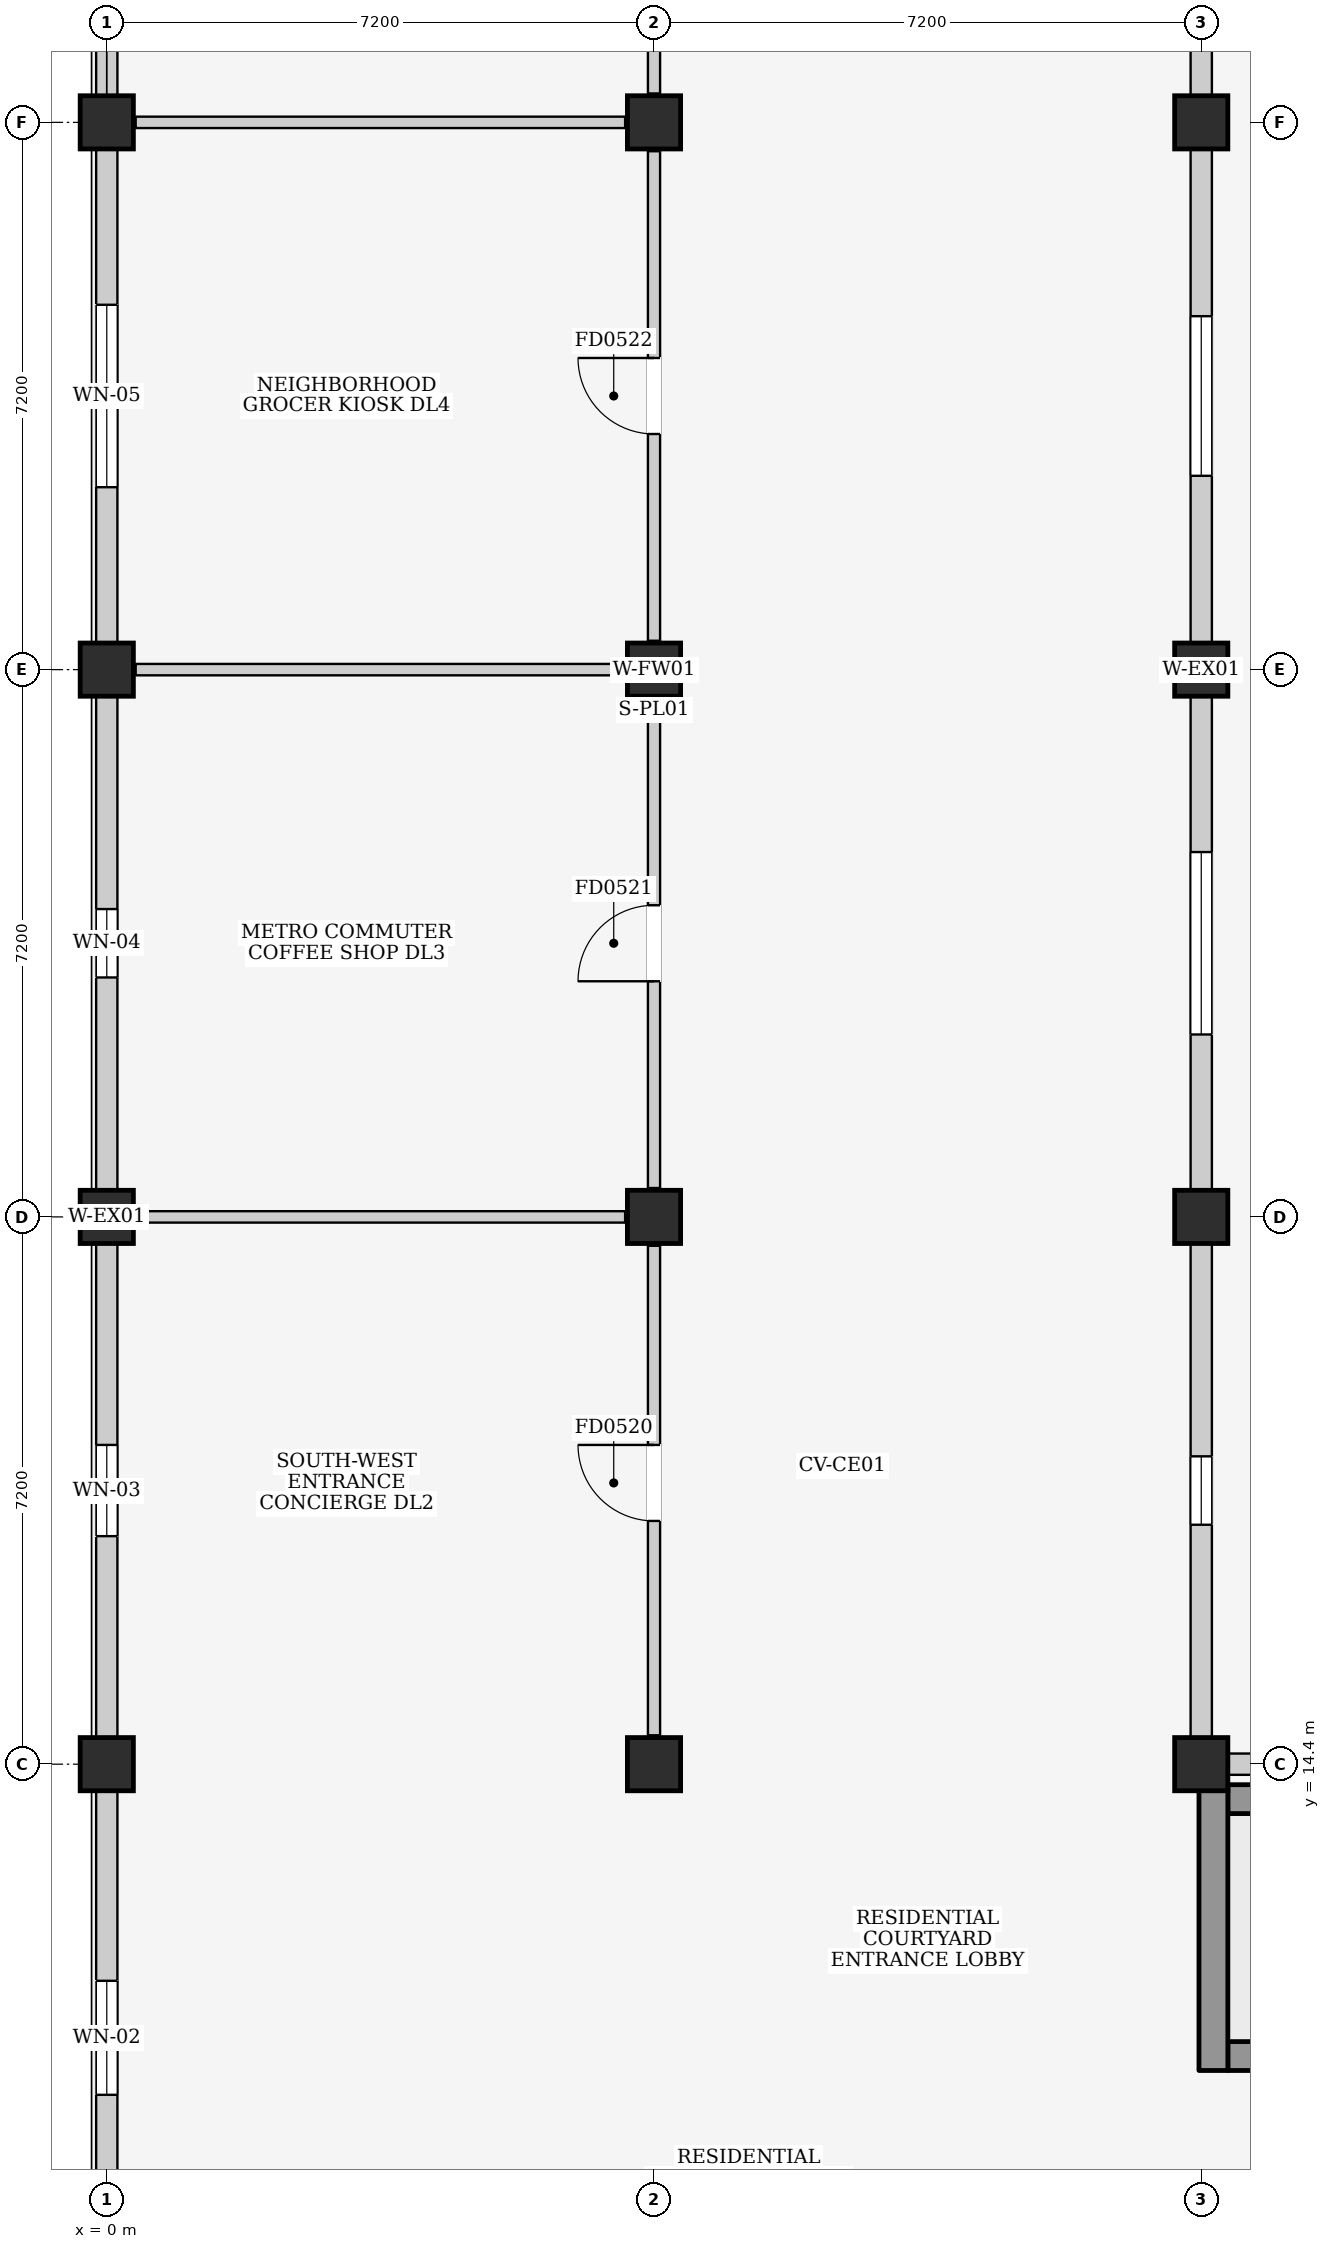
"""IFC4 building model, lengths in metres.
Left out: names, types, materials, properties, quantities, classifications, styles, units other than length and angle.
Written with IfcOpenShell. Run it as: python <this file> out.ifc"""

import sys

from ifc_helpers import new_model, si_unit, direction, frame, frame_2d, origin, origin_2d, place, context, subcontext, project, spatial, rectangle, extrude, element, fill, save


model = new_model("IFC4")
c1 = context("Model", 3, precision=1e-05, world=origin(), true_north=direction((0.0, 1.0)))
c2 = subcontext(c1, "Body", "Model", "MODEL_VIEW")
j1 = project(units=[si_unit("LENGTHUNIT", "METRE"), si_unit("PLANEANGLEUNIT", "RADIAN")], contexts=[c1])
p1 = place(None, origin())
s1 = spatial("IfcSite", under=j1, at=p1, CompositionType="ELEMENT")
p2 = place(p1, origin())
s2 = spatial("IfcBuilding", under=s1, at=p2, CompositionType="ELEMENT")
p3 = place(p2, origin())
s3 = spatial("IfcBuildingStorey", under=s2, at=p3, CompositionType="ELEMENT", Elevation=0.0)
for number, where, z_axis, x_axis in (
    (1, (0.0, 14.4, 0.0), (0.0, 0.0, 1.0), (1.0, 0.0, 0.0)),
    (2, (0.0, 21.6, 0.0), (0.0, 0.0, 1.0), (1.0, 0.0, 0.0)),
    (3, (0.0, 28.8, 0.0), (0.0, 0.0, 1.0), (1.0, 0.0, 0.0)),
    (4, (0.0, 36.0, 0.0), (0.0, 0.0, 1.0), (1.0, 0.0, 0.0)),
    (5, (7.2, 14.4, 0.0), (0.0, 0.0, 1.0), (1.0, 0.0, 0.0)),
    (6, (7.2, 21.6, 0.0), (0.0, 0.0, 1.0), (1.0, 0.0, 0.0)),
    (7, (7.2, 28.8, 0.0), (0.0, 0.0, 1.0), (1.0, 0.0, 0.0)),
    (8, (7.2, 36.0, 0.0), (0.0, 0.0, 1.0), (1.0, 0.0, 0.0)),
    (9, (14.4, 14.4, 0.0), (0.0, 0.0, 1.0), (1.0, 0.0, 0.0)),
    (10, (14.4, 21.6, 0.0), (0.0, 0.0, 1.0), (1.0, 0.0, 0.0)),
    (11, (14.4, 28.8, 0.0), (0.0, 0.0, 1.0), (1.0, 0.0, 0.0)),
    (12, (14.4, 36.0, 0.0), (0.0, 0.0, 1.0), (1.0, 0.0, 0.0)),
):
    element("IfcColumn", number, at=place(p3, frame(where, z_axis=z_axis, x_axis=x_axis)), inside=s3, PredefinedType="COLUMN", context=c2, shape_type="SweptSolid", body=[
        extrude(rectangle(XDim=0.7, YDim=0.7, at=origin_2d()), origin(), (0.0, 0.0, 1.0), 4.5),
    ])
p4 = place(p3, frame((0.0, 7.55, 0.0), z_axis=(0.0, 0.0, 1.0), x_axis=(0.0, 1.0, 0.0)))
e13 = element("IfcWall", 13, at=p4, inside=s3, PredefinedType="ELEMENTEDWALL", context=c2, shape_type="SweptSolid", body=[
    extrude(rectangle(XDim=6.5, YDim=0.28, at=frame_2d((3.25, 0.0))), origin(), (0.0, 0.0, 1.0), 3.665),
])
p5 = place(p4, frame((2.5, 0.0, 0.95)))
e14 = element("IfcOpeningElement", 14, at=p5, cuts=e13, PredefinedType="OPENING", context=c2, shape_type="SweptSolid", body=[
    extrude(rectangle(XDim=1.5, YDim=1.5, at=frame_2d((0.75, 0.75))), frame((0.0, 0.155, 0.0), z_axis=(0.0, -1.0, 0.0), x_axis=(1.0, 0.0, 0.0)), (0.0, 0.0, 1.0), 0.31),
])
p6 = place(p3, frame((0.0, 14.75, 0.0), z_axis=(0.0, 0.0, 1.0), x_axis=(0.0, 1.0, 0.0)))
e15 = element("IfcWall", 15, at=p6, inside=s3, PredefinedType="ELEMENTEDWALL", context=c2, shape_type="SweptSolid", body=[
    extrude(rectangle(XDim=6.5, YDim=0.28, at=frame_2d((3.25, 0.0))), origin(), (0.0, 0.0, 1.0), 3.665),
])
p7 = place(p6, frame((2.65, 0.0, 0.95)))
e16 = element("IfcOpeningElement", 16, at=p7, cuts=e15, PredefinedType="OPENING", context=c2, shape_type="SweptSolid", body=[
    extrude(rectangle(XDim=1.2, YDim=1.35, at=frame_2d((0.6, 0.675))), frame((0.0, 0.155, 0.0), z_axis=(0.0, -1.0, 0.0), x_axis=(1.0, 0.0, 0.0)), (0.0, 0.0, 1.0), 0.31),
])
p8 = place(p3, frame((0.0, 21.95, 0.0), z_axis=(0.0, 0.0, 1.0), x_axis=(0.0, 1.0, 0.0)))
e17 = element("IfcWall", 17, at=p8, inside=s3, PredefinedType="ELEMENTEDWALL", context=c2, shape_type="SweptSolid", body=[
    extrude(rectangle(XDim=6.5, YDim=0.28, at=frame_2d((3.25, 0.0))), origin(), (0.0, 0.0, 1.0), 3.665),
])
p9 = place(p8, frame((2.8, 0.0, 0.95)))
e18 = element("IfcOpeningElement", 18, at=p9, cuts=e17, PredefinedType="OPENING", context=c2, shape_type="SweptSolid", body=[
    extrude(rectangle(XDim=0.9, YDim=1.1, at=frame_2d((0.45, 0.55))), frame((0.0, 0.155, 0.0), z_axis=(0.0, -1.0, 0.0), x_axis=(1.0, 0.0, 0.0)), (0.0, 0.0, 1.0), 0.31),
])
p10 = place(p3, frame((0.0, 29.15, 0.0), z_axis=(0.0, 0.0, 1.0), x_axis=(0.0, 1.0, 0.0)))
e19 = element("IfcWall", 19, at=p10, inside=s3, PredefinedType="ELEMENTEDWALL", context=c2, shape_type="SweptSolid", body=[
    extrude(rectangle(XDim=6.5, YDim=0.28, at=frame_2d((3.25, 0.0))), origin(), (0.0, 0.0, 1.0), 3.665),
])
p11 = place(p10, frame((2.05, 0.0, 0.95)))
e20 = element("IfcOpeningElement", 20, at=p11, cuts=e19, PredefinedType="OPENING", context=c2, shape_type="SweptSolid", body=[
    extrude(rectangle(XDim=2.4, YDim=1.65, at=frame_2d((1.2, 0.825))), frame((0.0, 0.155, 0.0), z_axis=(0.0, -1.0, 0.0), x_axis=(1.0, 0.0, 0.0)), (0.0, 0.0, 1.0), 0.31),
])
p12 = place(p3, frame((0.0, 36.35, 0.0), z_axis=(0.0, 0.0, 1.0), x_axis=(0.0, 1.0, 0.0)))
e21 = element("IfcWall", 21, at=p12, inside=s3, PredefinedType="ELEMENTEDWALL", context=c2, shape_type="SweptSolid", body=[
    extrude(rectangle(XDim=6.5, YDim=0.28, at=frame_2d((3.25, 0.0))), origin(), (0.0, 0.0, 1.0), 3.665),
])
p13 = place(p12, frame((2.2, 0.0, 0.95)))
e22 = element("IfcOpeningElement", 22, at=p13, cuts=e21, PredefinedType="OPENING", context=c2, shape_type="SweptSolid", body=[
    extrude(rectangle(XDim=2.1, YDim=1.65, at=frame_2d((1.05, 0.825))), frame((0.0, 0.155, 0.0), z_axis=(0.0, -1.0, 0.0), x_axis=(1.0, 0.0, 0.0)), (0.0, 0.0, 1.0), 0.31),
])
p14 = place(p3, frame((14.4, 14.75, 0.0), z_axis=(0.0, 0.0, 1.0), x_axis=(0.0, 1.0, 0.0)))
e23 = element("IfcWall", 23, at=p14, inside=s3, PredefinedType="ELEMENTEDWALL", context=c2, shape_type="SweptSolid", body=[
    extrude(rectangle(XDim=6.5, YDim=0.28, at=frame_2d((3.25, 0.0))), origin(), (0.0, 0.0, 1.0), 3.435),
])
p15 = place(p14, frame((2.8, 0.0, 0.95)))
e24 = element("IfcOpeningElement", 24, at=p15, cuts=e23, PredefinedType="OPENING", context=c2, shape_type="SweptSolid", body=[
    extrude(rectangle(XDim=0.9, YDim=1.1, at=frame_2d((0.45, 0.55))), frame((0.0, 0.155, 0.0), z_axis=(0.0, -1.0, 0.0), x_axis=(1.0, 0.0, 0.0)), (0.0, 0.0, 1.0), 0.31),
])
p16 = place(p3, frame((14.4, 21.95, 0.0), z_axis=(0.0, 0.0, 1.0), x_axis=(0.0, 1.0, 0.0)))
e25 = element("IfcWall", 25, at=p16, inside=s3, PredefinedType="ELEMENTEDWALL", context=c2, shape_type="SweptSolid", body=[
    extrude(rectangle(XDim=6.5, YDim=0.28, at=frame_2d((3.25, 0.0))), origin(), (0.0, 0.0, 1.0), 3.435),
])
p17 = place(p16, frame((2.05, 0.0, 0.95)))
e26 = element("IfcOpeningElement", 26, at=p17, cuts=e25, PredefinedType="OPENING", context=c2, shape_type="SweptSolid", body=[
    extrude(rectangle(XDim=2.4, YDim=1.65, at=frame_2d((1.2, 0.825))), frame((0.0, 0.155, 0.0), z_axis=(0.0, -1.0, 0.0), x_axis=(1.0, 0.0, 0.0)), (0.0, 0.0, 1.0), 0.31),
])
p18 = place(p3, frame((14.4, 29.15, 0.0), z_axis=(0.0, 0.0, 1.0), x_axis=(0.0, 1.0, 0.0)))
e27 = element("IfcWall", 27, at=p18, inside=s3, PredefinedType="ELEMENTEDWALL", context=c2, shape_type="SweptSolid", body=[
    extrude(rectangle(XDim=6.5, YDim=0.28, at=frame_2d((3.25, 0.0))), origin(), (0.0, 0.0, 1.0), 3.435),
])
p19 = place(p18, frame((2.2, 0.0, 0.95)))
e28 = element("IfcOpeningElement", 28, at=p19, cuts=e27, PredefinedType="OPENING", context=c2, shape_type="SweptSolid", body=[
    extrude(rectangle(XDim=2.1, YDim=1.65, at=frame_2d((1.05, 0.825))), frame((0.0, 0.155, 0.0), z_axis=(0.0, -1.0, 0.0), x_axis=(1.0, 0.0, 0.0)), (0.0, 0.0, 1.0), 0.31),
])
p20 = place(p3, frame((14.4, 36.35, 0.0), z_axis=(0.0, 0.0, 1.0), x_axis=(0.0, 1.0, 0.0)))
e29 = element("IfcWall", 29, at=p20, inside=s3, PredefinedType="ELEMENTEDWALL", context=c2, shape_type="SweptSolid", body=[
    extrude(rectangle(XDim=6.5, YDim=0.28, at=frame_2d((3.25, 0.0))), origin(), (0.0, 0.0, 1.0), 3.435),
])
p21 = place(p20, frame((2.55, 0.0, 0.95)))
e30 = element("IfcOpeningElement", 30, at=p21, cuts=e29, PredefinedType="OPENING", context=c2, shape_type="SweptSolid", body=[
    extrude(rectangle(XDim=1.4, YDim=1.2, at=frame_2d((0.7, 0.6))), frame((0.0, 0.155, 0.0), z_axis=(0.0, -1.0, 0.0), x_axis=(1.0, 0.0, 0.0)), (0.0, 0.0, 1.0), 0.31),
])
p22 = place(p3, frame((14.75, 14.4, 0.0), z_axis=(0.0, 0.0, 1.0), x_axis=(1.0, 0.0, 0.0)))
e31 = element("IfcWall", 31, at=p22, inside=s3, PredefinedType="ELEMENTEDWALL", context=c2, shape_type="SweptSolid", body=[
    extrude(rectangle(XDim=6.5, YDim=0.28, at=frame_2d((3.25, 0.0))), origin(), (0.0, 0.0, 1.0), 3.435),
])
p23 = place(p22, frame((2.8, 0.0, 0.95)))
e32 = element("IfcOpeningElement", 32, at=p23, cuts=e31, PredefinedType="OPENING", context=c2, shape_type="SweptSolid", body=[
    extrude(rectangle(XDim=0.9, YDim=1.1, at=frame_2d((0.45, 0.55))), frame((0.0, 0.155, 0.0), z_axis=(0.0, -1.0, 0.0), x_axis=(1.0, 0.0, 0.0)), (0.0, 0.0, 1.0), 0.31),
])
p24 = place(p3, frame((14.75, 10.56, 0.0), z_axis=(0.0, 0.0, 1.0), x_axis=(1.0, 0.0, 0.0)))
e33 = element("IfcWall", 33, at=p24, inside=s3, PredefinedType="SHEAR", context=c2, shape_type="SweptSolid", body=[
    extrude(rectangle(XDim=6.5, YDim=0.38, at=frame_2d((3.25, 0.0))), origin(), (0.0, 0.0, 1.0), 4.2),
])
p25 = place(p24, frame((5.17, 0.0, 0.0)))
e34 = element("IfcOpeningElement", 34, at=p25, cuts=e33, PredefinedType="OPENING", context=c2, shape_type="SweptSolid", body=[
    extrude(rectangle(XDim=1.15, YDim=2.2, at=frame_2d((0.575, 1.1))), frame((0.0, 0.205, 0.0), z_axis=(0.0, -1.0, 0.0), x_axis=(1.0, 0.0, 0.0)), (0.0, 0.0, 1.0), 0.41),
])
p26 = place(p3, frame((14.75, 13.94, 0.0), z_axis=(0.0, 0.0, 1.0), x_axis=(1.0, 0.0, 0.0)))
e35 = element("IfcWall", 35, at=p26, inside=s3, PredefinedType="SHEAR", context=c2, shape_type="SweptSolid", body=[
    extrude(rectangle(XDim=6.5, YDim=0.38, at=frame_2d((3.25, 0.0))), origin(), (0.0, 0.0, 1.0), 4.2),
])
p27 = place(p3, frame((14.56, 10.37, 0.0), z_axis=(0.0, 0.0, 1.0), x_axis=(0.0, 1.0, 0.0)))
e36 = element("IfcWall", 36, at=p27, inside=s3, PredefinedType="SHEAR", context=c2, shape_type="SweptSolid", body=[
    extrude(rectangle(XDim=3.76, YDim=0.38, at=frame_2d((1.88, 0.0))), origin(), (0.0, 0.0, 1.0), 4.2),
])
p28 = place(p3, frame((7.2, 14.78, 0.0), z_axis=(0.0, 0.0, 1.0), x_axis=(0.0, 1.0, 0.0)))
e37 = element("IfcWall", 37, at=p28, inside=s3, PredefinedType="PARTITIONING", context=c2, shape_type="SweptSolid", body=[
    extrude(rectangle(XDim=6.44, YDim=0.16, at=frame_2d((3.22, 0.0))), origin(), (0.0, 0.0, 1.0), 3.435),
])
p29 = place(p28, frame((2.82, 0.0, 0.0)))
e38 = element("IfcOpeningElement", 38, at=p29, cuts=e37, PredefinedType="OPENING", context=c2, shape_type="SweptSolid", body=[
    extrude(rectangle(XDim=1.0, YDim=2.15, at=frame_2d((0.5, 1.075))), frame((0.0, 0.095, 0.0), z_axis=(0.0, -1.0, 0.0), x_axis=(1.0, 0.0, 0.0)), (0.0, 0.0, 1.0), 0.19),
])
p30 = place(p3, frame((0.38, 21.6, 0.0), z_axis=(0.0, 0.0, 1.0), x_axis=(1.0, 0.0, 0.0)))
e39 = element("IfcWall", 39, at=p30, inside=s3, PredefinedType="PARTITIONING", context=c2, shape_type="SweptSolid", body=[
    extrude(rectangle(XDim=6.44, YDim=0.15, at=frame_2d((3.22, 0.0))), origin(), (0.0, 0.0, 1.0), 3.435),
])
p31 = place(p3, frame((7.2, 21.98, 0.0), z_axis=(0.0, 0.0, 1.0), x_axis=(0.0, 1.0, 0.0)))
e40 = element("IfcWall", 40, at=p31, inside=s3, PredefinedType="PARTITIONING", context=c2, shape_type="SweptSolid", body=[
    extrude(rectangle(XDim=6.44, YDim=0.16, at=frame_2d((3.22, 0.0))), origin(), (0.0, 0.0, 1.0), 3.435),
])
p32 = place(p31, frame((2.72, 0.0, 0.0)))
e41 = element("IfcOpeningElement", 41, at=p32, cuts=e40, PredefinedType="OPENING", context=c2, shape_type="SweptSolid", body=[
    extrude(rectangle(XDim=1.0, YDim=2.15, at=frame_2d((0.5, 1.075))), frame((0.0, 0.095, 0.0), z_axis=(0.0, -1.0, 0.0), x_axis=(1.0, 0.0, 0.0)), (0.0, 0.0, 1.0), 0.19),
])
p33 = place(p3, frame((0.38, 28.8, 0.0), z_axis=(0.0, 0.0, 1.0), x_axis=(1.0, 0.0, 0.0)))
e42 = element("IfcWall", 42, at=p33, inside=s3, PredefinedType="PARTITIONING", context=c2, shape_type="SweptSolid", body=[
    extrude(rectangle(XDim=6.44, YDim=0.15, at=frame_2d((3.22, 0.0))), origin(), (0.0, 0.0, 1.0), 3.435),
])
p34 = place(p3, frame((7.2, 29.18, 0.0), z_axis=(0.0, 0.0, 1.0), x_axis=(0.0, 1.0, 0.0)))
e43 = element("IfcWall", 43, at=p34, inside=s3, PredefinedType="PARTITIONING", context=c2, shape_type="SweptSolid", body=[
    extrude(rectangle(XDim=6.44, YDim=0.16, at=frame_2d((3.22, 0.0))), origin(), (0.0, 0.0, 1.0), 3.435),
])
p35 = place(p34, frame((2.72, 0.0, 0.0)))
e44 = element("IfcOpeningElement", 44, at=p35, cuts=e43, PredefinedType="OPENING", context=c2, shape_type="SweptSolid", body=[
    extrude(rectangle(XDim=1.0, YDim=2.15, at=frame_2d((0.5, 1.075))), frame((0.0, 0.095, 0.0), z_axis=(0.0, -1.0, 0.0), x_axis=(1.0, 0.0, 0.0)), (0.0, 0.0, 1.0), 0.19),
])
p36 = place(p3, frame((0.38, 36.0, 0.0), z_axis=(0.0, 0.0, 1.0), x_axis=(1.0, 0.0, 0.0)))
e45 = element("IfcWall", 45, at=p36, inside=s3, PredefinedType="PARTITIONING", context=c2, shape_type="SweptSolid", body=[
    extrude(rectangle(XDim=6.44, YDim=0.15, at=frame_2d((3.22, 0.0))), origin(), (0.0, 0.0, 1.0), 3.435),
])
p37 = place(p3, frame((7.2, 36.38, 0.0), z_axis=(0.0, 0.0, 1.0), x_axis=(0.0, 1.0, 0.0)))
e46 = element("IfcWall", 46, at=p37, inside=s3, PredefinedType="PARTITIONING", context=c2, shape_type="SweptSolid", body=[
    extrude(rectangle(XDim=6.44, YDim=0.16, at=frame_2d((3.22, 0.0))), origin(), (0.0, 0.0, 1.0), 3.435),
])
p38 = place(p37, frame((2.62, 0.0, 0.0)))
e47 = element("IfcOpeningElement", 47, at=p38, cuts=e46, PredefinedType="OPENING", context=c2, shape_type="SweptSolid", body=[
    extrude(rectangle(XDim=1.0, YDim=2.15, at=frame_2d((0.5, 1.075))), frame((0.0, 0.095, 0.0), z_axis=(0.0, -1.0, 0.0), x_axis=(1.0, 0.0, 0.0)), (0.0, 0.0, 1.0), 0.19),
])
p39 = place(p5, origin())
e48 = element("IfcWindow", 48, at=p39, inside=s3, PartitioningType="DOUBLE_PANEL_VERTICAL", PredefinedType="WINDOW", context=c2, shape_type="SweptSolid", body=[
    extrude(rectangle(XDim=1.5, YDim=1.5, at=frame_2d((0.75, 0.75))), frame((0.0, 0.03, 0.0), z_axis=(0.0, -1.0, 0.0), x_axis=(1.0, 0.0, 0.0)), (0.0, 0.0, 1.0), 0.06),
])
fill(e14, e48)
p40 = place(p7, origin())
e49 = element("IfcWindow", 49, at=p40, inside=s3, PartitioningType="SINGLE_PANEL", PredefinedType="WINDOW", context=c2, shape_type="SweptSolid", body=[
    extrude(rectangle(XDim=1.2, YDim=1.35, at=frame_2d((0.6, 0.675))), frame((0.0, 0.03, 0.0), z_axis=(0.0, -1.0, 0.0), x_axis=(1.0, 0.0, 0.0)), (0.0, 0.0, 1.0), 0.06),
])
fill(e16, e49)
p41 = place(p9, origin())
e50 = element("IfcWindow", 50, at=p41, inside=s3, PartitioningType="SINGLE_PANEL", PredefinedType="WINDOW", context=c2, shape_type="SweptSolid", body=[
    extrude(rectangle(XDim=0.9, YDim=1.1, at=frame_2d((0.45, 0.55))), frame((0.0, 0.03, 0.0), z_axis=(0.0, -1.0, 0.0), x_axis=(1.0, 0.0, 0.0)), (0.0, 0.0, 1.0), 0.06),
])
fill(e18, e50)
p42 = place(p11, origin())
e51 = element("IfcWindow", 51, at=p42, inside=s3, PartitioningType="TRIPLE_PANEL_VERTICAL", PredefinedType="WINDOW", context=c2, shape_type="SweptSolid", body=[
    extrude(rectangle(XDim=2.4, YDim=1.65, at=frame_2d((1.2, 0.825))), frame((0.0, 0.03, 0.0), z_axis=(0.0, -1.0, 0.0), x_axis=(1.0, 0.0, 0.0)), (0.0, 0.0, 1.0), 0.06),
])
fill(e20, e51)
p43 = place(p15, origin())
e52 = element("IfcWindow", 52, at=p43, inside=s3, PartitioningType="SINGLE_PANEL", PredefinedType="WINDOW", context=c2, shape_type="SweptSolid", body=[
    extrude(rectangle(XDim=0.9, YDim=1.1, at=frame_2d((0.45, 0.55))), frame((0.0, 0.03, 0.0), z_axis=(0.0, -1.0, 0.0), x_axis=(1.0, 0.0, 0.0)), (0.0, 0.0, 1.0), 0.06),
])
fill(e24, e52)
p44 = place(p17, origin())
e53 = element("IfcWindow", 53, at=p44, inside=s3, PartitioningType="TRIPLE_PANEL_VERTICAL", PredefinedType="WINDOW", context=c2, shape_type="SweptSolid", body=[
    extrude(rectangle(XDim=2.4, YDim=1.65, at=frame_2d((1.2, 0.825))), frame((0.0, 0.03, 0.0), z_axis=(0.0, -1.0, 0.0), x_axis=(1.0, 0.0, 0.0)), (0.0, 0.0, 1.0), 0.06),
])
fill(e26, e53)
p45 = place(p19, origin())
e54 = element("IfcWindow", 54, at=p45, inside=s3, PartitioningType="DOUBLE_PANEL_VERTICAL", PredefinedType="WINDOW", context=c2, shape_type="SweptSolid", body=[
    extrude(rectangle(XDim=2.1, YDim=1.65, at=frame_2d((1.05, 0.825))), frame((0.0, 0.03, 0.0), z_axis=(0.0, -1.0, 0.0), x_axis=(1.0, 0.0, 0.0)), (0.0, 0.0, 1.0), 0.06),
])
fill(e28, e54)
p46 = place(p29, origin())
e55 = element("IfcDoor", 55, at=p46, inside=s3, OperationType="SINGLE_SWING_RIGHT", PredefinedType="DOOR", context=c2, shape_type="SweptSolid", body=[
    extrude(rectangle(XDim=1.0, YDim=2.15, at=frame_2d((0.5, 1.075))), frame((0.0, 0.025, 0.0), z_axis=(0.0, -1.0, 0.0), x_axis=(1.0, 0.0, 0.0)), (0.0, 0.0, 1.0), 0.05),
])
fill(e38, e55)
p47 = place(p32, origin())
e56 = element("IfcDoor", 56, at=p47, inside=s3, OperationType="SINGLE_SWING_LEFT", PredefinedType="DOOR", context=c2, shape_type="SweptSolid", body=[
    extrude(rectangle(XDim=1.0, YDim=2.15, at=frame_2d((0.5, 1.075))), frame((0.0, 0.025, 0.0), z_axis=(0.0, -1.0, 0.0), x_axis=(1.0, 0.0, 0.0)), (0.0, 0.0, 1.0), 0.05),
])
fill(e41, e56)
p48 = place(p35, origin())
e57 = element("IfcDoor", 57, at=p48, inside=s3, OperationType="SINGLE_SWING_RIGHT", PredefinedType="DOOR", context=c2, shape_type="SweptSolid", body=[
    extrude(rectangle(XDim=1.0, YDim=2.15, at=frame_2d((0.5, 1.075))), frame((0.0, 0.025, 0.0), z_axis=(0.0, -1.0, 0.0), x_axis=(1.0, 0.0, 0.0)), (0.0, 0.0, 1.0), 0.05),
])
fill(e44, e57)
save(model, sys.argv[1])
